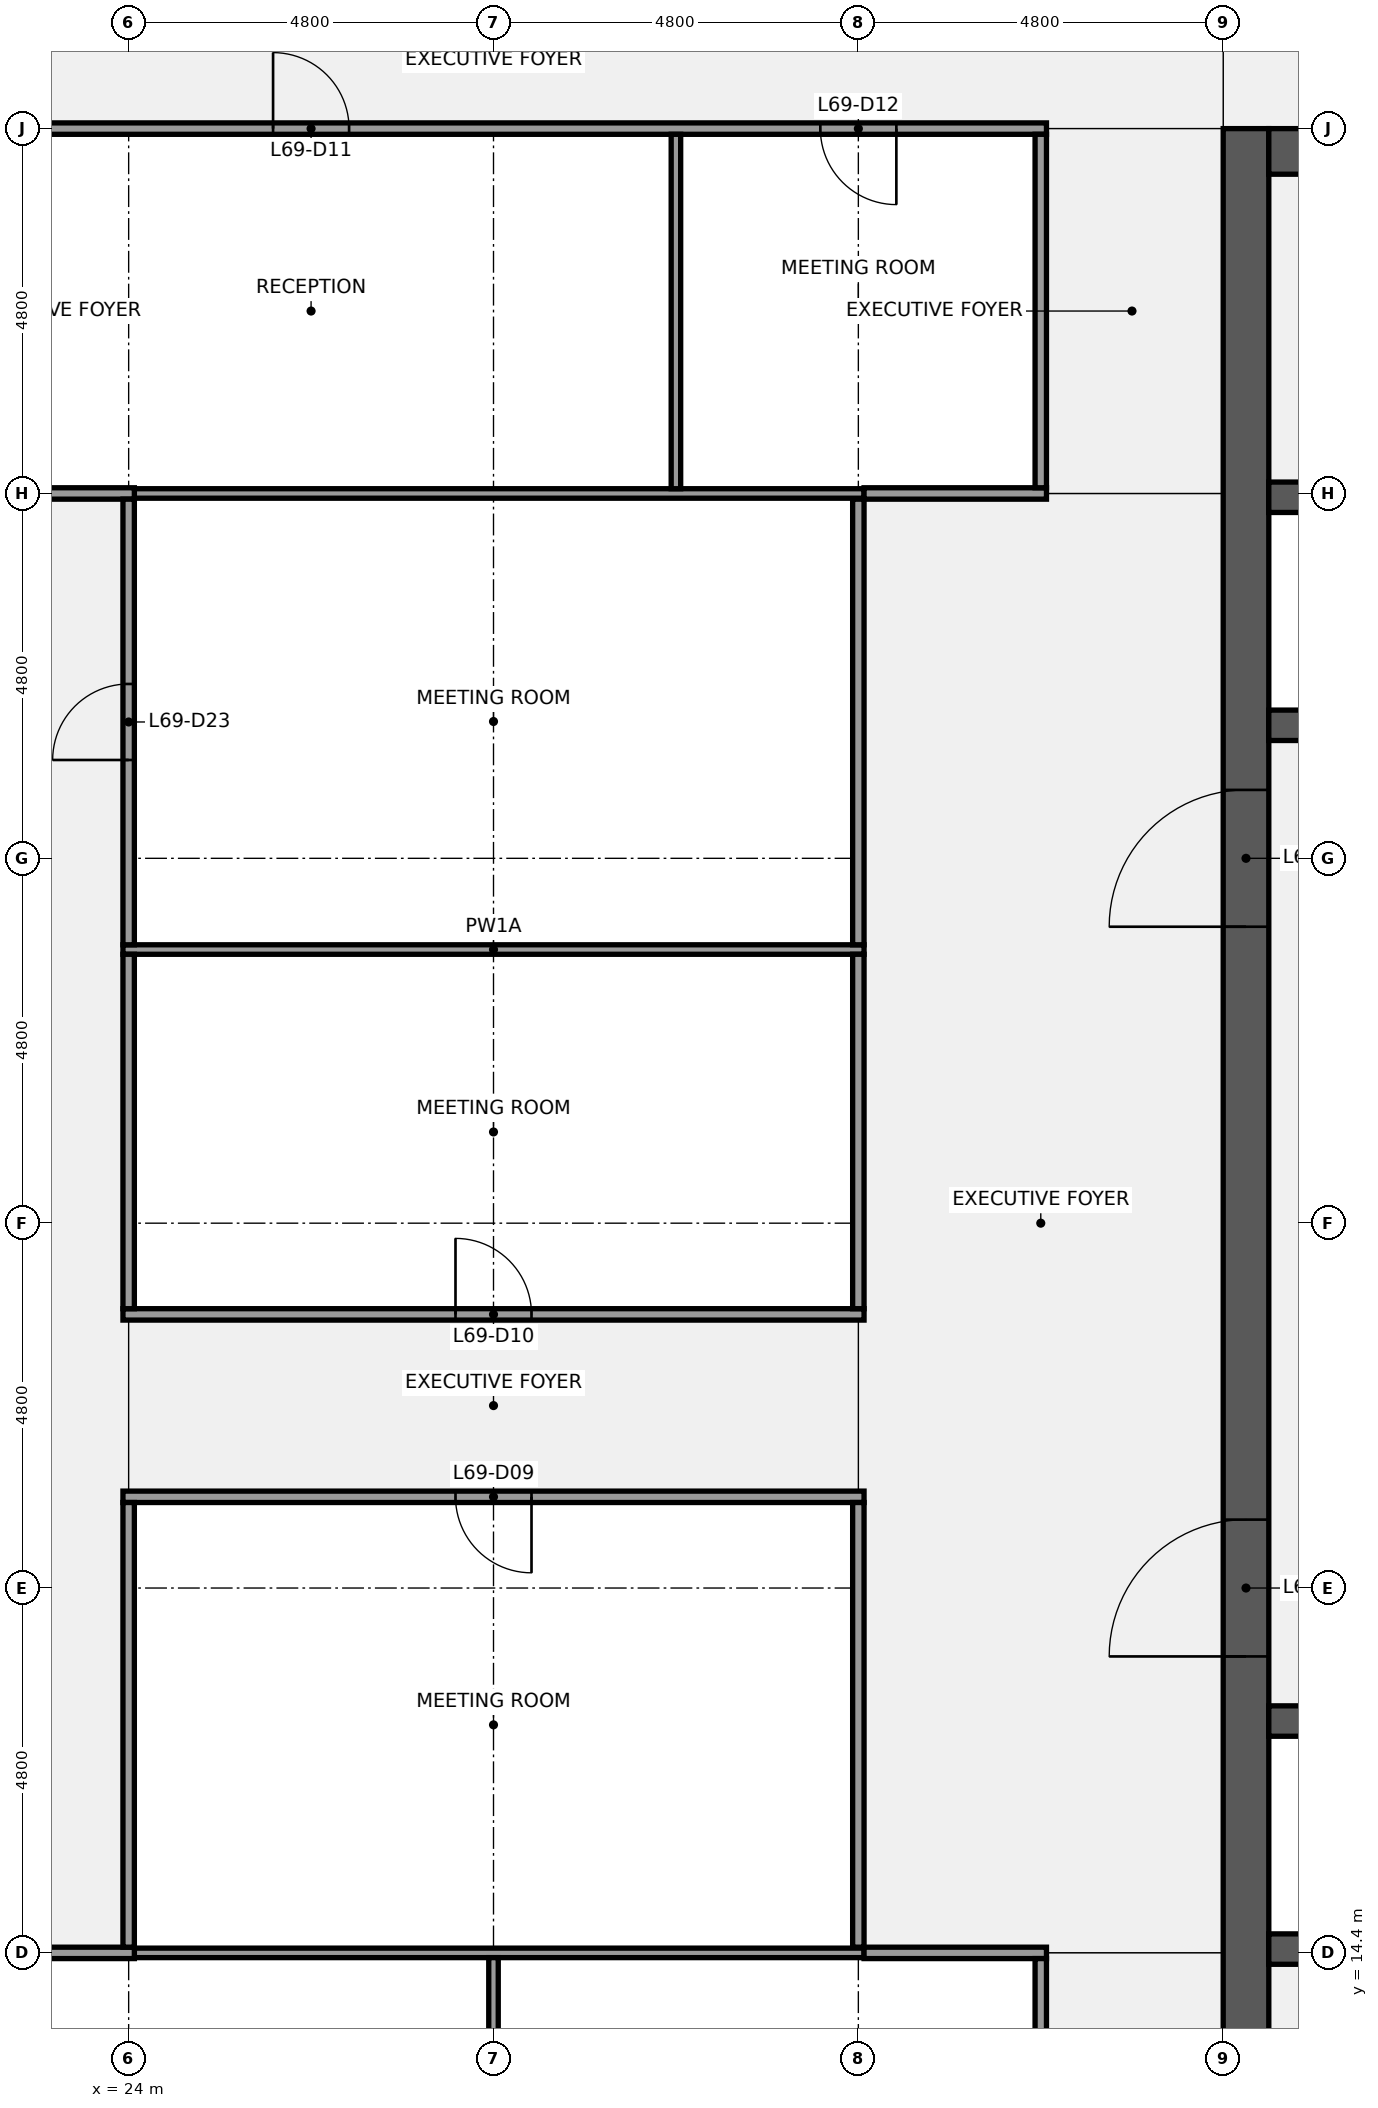
"""IFC4 building model, lengths in metres.
Left out: names, types, materials, properties, quantities, classifications, styles, units other than length and angle.
Written with IfcOpenShell. Run it as: python <this file> out.ifc"""

import sys

from ifc_helpers import new_model, si_unit, direction, frame, frame_2d, origin, place, context, subcontext, project, spatial, rectangle, extrude, element, fill, save


model = new_model("IFC4")
c1 = context("Model", 3, precision=1e-05, world=origin(), true_north=direction((0.0, 1.0)))
c2 = subcontext(c1, "Body", "Model", "MODEL_VIEW")
j1 = project(units=[si_unit("LENGTHUNIT", "METRE"), si_unit("PLANEANGLEUNIT", "RADIAN")], contexts=[c1])
p1 = place(None, origin())
s1 = spatial("IfcSite", under=j1, at=p1, CompositionType="ELEMENT")
p2 = place(p1, origin())
s2 = spatial("IfcBuilding", under=s1, at=p2, CompositionType="ELEMENT")
p3 = place(p2, frame((0.0, 0.0, 314.3)))
s3 = spatial("IfcBuildingStorey", under=s2, at=p3, CompositionType="ELEMENT", Elevation=314.3)
p4 = place(p3, frame((38.7, 9.6, 0.0), z_axis=(0.0, 0.0, 1.0), x_axis=(0.0, 1.0, 0.0)))
e1 = element("IfcWall", 1, at=p4, inside=s3, PredefinedType="SHEAR", context=c2, shape_type="SweptSolid", body=[
    extrude(rectangle(XDim=28.8, YDim=0.6, at=frame_2d((14.4, 0.0))), origin(), (0.0, 0.0, 1.0), 3.84),
])
p5 = place(p4, frame((8.7, 0.0, 0.0)))
e2 = element("IfcOpeningElement", 2, at=p5, cuts=e1, PredefinedType="OPENING", context=c2, shape_type="SweptSolid", body=[
    extrude(rectangle(XDim=1.8, YDim=2.1, at=frame_2d((0.9, 1.05))), frame((0.0, 0.31, 0.0), z_axis=(0.0, -1.0, 0.0), x_axis=(1.0, 0.0, 0.0)), (0.0, 0.0, 1.0), 0.62),
])
p6 = place(p4, frame((18.3, 0.0, 0.0)))
e3 = element("IfcOpeningElement", 3, at=p6, cuts=e1, PredefinedType="OPENING", context=c2, shape_type="SweptSolid", body=[
    extrude(rectangle(XDim=1.8, YDim=2.1, at=frame_2d((0.9, 1.05))), frame((0.0, 0.31, 0.0), z_axis=(0.0, -1.0, 0.0), x_axis=(1.0, 0.0, 0.0)), (0.0, 0.0, 1.0), 0.62),
])
p7 = place(p3, frame((39.0, 14.45, 0.0), z_axis=(0.0, 0.0, 1.0), x_axis=(1.0, 0.0, 0.0)))
e4 = element("IfcWall", 4, at=p7, inside=s3, PredefinedType="SHEAR", context=c2, shape_type="SweptSolid", body=[
    extrude(rectangle(XDim=18.0, YDim=0.4, at=frame_2d((9.0, 0.0))), origin(), (0.0, 0.0, 1.0), 3.84),
])
p8 = place(p3, frame((39.0, 17.45, 0.0), z_axis=(0.0, 0.0, 1.0), x_axis=(1.0, 0.0, 0.0)))
e5 = element("IfcWall", 5, at=p8, inside=s3, PredefinedType="SHEAR", context=c2, shape_type="SweptSolid", body=[
    extrude(rectangle(XDim=18.0, YDim=0.4, at=frame_2d((9.0, 0.0))), origin(), (0.0, 0.0, 1.0), 3.84),
])
p9 = place(p8, frame((14.837, 0.0, 0.0)))
e6 = element("IfcOpeningElement", 6, at=p9, cuts=e5, PredefinedType="OPENING", context=c2, shape_type="SweptSolid", body=[
    extrude(rectangle(XDim=1.0, YDim=2.1, at=frame_2d((0.5, 1.05))), frame((0.0, 0.21, 0.0), z_axis=(0.0, -1.0, 0.0), x_axis=(1.0, 0.0, 0.0)), (0.0, 0.0, 1.0), 0.42),
])
p10 = place(p8, frame((10.9, 0.0, 0.0)))
e7 = element("IfcOpeningElement", 7, at=p10, cuts=e5, PredefinedType="OPENING", context=c2, shape_type="SweptSolid", body=[
    extrude(rectangle(XDim=1.0, YDim=2.1, at=frame_2d((0.5, 1.05))), frame((0.0, 0.21, 0.0), z_axis=(0.0, -1.0, 0.0), x_axis=(1.0, 0.0, 0.0)), (0.0, 0.0, 1.0), 0.42),
])
p11 = place(p8, frame((8.5, 0.0, 0.0)))
e8 = element("IfcOpeningElement", 8, at=p11, cuts=e5, PredefinedType="OPENING", context=c2, shape_type="SweptSolid", body=[
    extrude(rectangle(XDim=1.0, YDim=2.1, at=frame_2d((0.5, 1.05))), frame((0.0, 0.21, 0.0), z_axis=(0.0, -1.0, 0.0), x_axis=(1.0, 0.0, 0.0)), (0.0, 0.0, 1.0), 0.42),
])
p12 = place(p8, frame((3.363, 0.0, 0.0)))
e9 = element("IfcOpeningElement", 9, at=p12, cuts=e5, PredefinedType="OPENING", context=c2, shape_type="SweptSolid", body=[
    extrude(rectangle(XDim=1.0, YDim=2.1, at=frame_2d((0.5, 1.05))), frame((0.0, 0.21, 0.0), z_axis=(0.0, -1.0, 0.0), x_axis=(1.0, 0.0, 0.0)), (0.0, 0.0, 1.0), 0.42),
])
p13 = place(p3, frame((39.0, 30.55, 0.0), z_axis=(0.0, 0.0, 1.0), x_axis=(1.0, 0.0, 0.0)))
e10 = element("IfcWall", 10, at=p13, inside=s3, PredefinedType="SHEAR", context=c2, shape_type="SweptSolid", body=[
    extrude(rectangle(XDim=18.0, YDim=0.4, at=frame_2d((9.0, 0.0))), origin(), (0.0, 0.0, 1.0), 3.84),
])
p14 = place(p13, frame((15.2, 0.0, 0.0)))
e11 = element("IfcOpeningElement", 11, at=p14, cuts=e10, PredefinedType="OPENING", context=c2, shape_type="SweptSolid", body=[
    extrude(rectangle(XDim=1.2, YDim=2.1, at=frame_2d((0.6, 1.05))), frame((0.0, 0.21, 0.0), z_axis=(0.0, -1.0, 0.0), x_axis=(1.0, 0.0, 0.0)), (0.0, 0.0, 1.0), 0.42),
])
p15 = place(p13, frame((12.6, 0.0, 0.0)))
e12 = element("IfcOpeningElement", 12, at=p15, cuts=e10, PredefinedType="OPENING", context=c2, shape_type="SweptSolid", body=[
    extrude(rectangle(XDim=1.2, YDim=2.1, at=frame_2d((0.6, 1.05))), frame((0.0, 0.21, 0.0), z_axis=(0.0, -1.0, 0.0), x_axis=(1.0, 0.0, 0.0)), (0.0, 0.0, 1.0), 0.42),
])
p16 = place(p13, frame((10.0, 0.0, 0.0)))
e13 = element("IfcOpeningElement", 13, at=p16, cuts=e10, PredefinedType="OPENING", context=c2, shape_type="SweptSolid", body=[
    extrude(rectangle(XDim=1.2, YDim=2.1, at=frame_2d((0.6, 1.05))), frame((0.0, 0.21, 0.0), z_axis=(0.0, -1.0, 0.0), x_axis=(1.0, 0.0, 0.0)), (0.0, 0.0, 1.0), 0.42),
])
p17 = place(p13, frame((6.8, 0.0, 0.0)))
e14 = element("IfcOpeningElement", 14, at=p17, cuts=e10, PredefinedType="OPENING", context=c2, shape_type="SweptSolid", body=[
    extrude(rectangle(XDim=1.2, YDim=2.1, at=frame_2d((0.6, 1.05))), frame((0.0, 0.21, 0.0), z_axis=(0.0, -1.0, 0.0), x_axis=(1.0, 0.0, 0.0)), (0.0, 0.0, 1.0), 0.42),
])
p18 = place(p13, frame((4.2, 0.0, 0.0)))
e15 = element("IfcOpeningElement", 15, at=p18, cuts=e10, PredefinedType="OPENING", context=c2, shape_type="SweptSolid", body=[
    extrude(rectangle(XDim=1.2, YDim=2.1, at=frame_2d((0.6, 1.05))), frame((0.0, 0.21, 0.0), z_axis=(0.0, -1.0, 0.0), x_axis=(1.0, 0.0, 0.0)), (0.0, 0.0, 1.0), 0.42),
])
p19 = place(p13, frame((1.6, 0.0, 0.0)))
e16 = element("IfcOpeningElement", 16, at=p19, cuts=e10, PredefinedType="OPENING", context=c2, shape_type="SweptSolid", body=[
    extrude(rectangle(XDim=1.2, YDim=2.1, at=frame_2d((0.6, 1.05))), frame((0.0, 0.21, 0.0), z_axis=(0.0, -1.0, 0.0), x_axis=(1.0, 0.0, 0.0)), (0.0, 0.0, 1.0), 0.42),
])
p20 = place(p3, frame((39.0, 33.55, 0.0), z_axis=(0.0, 0.0, 1.0), x_axis=(1.0, 0.0, 0.0)))
e17 = element("IfcWall", 17, at=p20, inside=s3, PredefinedType="SHEAR", context=c2, shape_type="SweptSolid", body=[
    extrude(rectangle(XDim=18.0, YDim=0.4, at=frame_2d((9.0, 0.0))), origin(), (0.0, 0.0, 1.0), 3.84),
])
p21 = place(p3, frame((39.0, 38.1, 0.0), z_axis=(0.0, 0.0, 1.0), x_axis=(1.0, 0.0, 0.0)))
e18 = element("IfcWall", 18, at=p21, inside=s3, PredefinedType="SHEAR", context=c2, shape_type="SweptSolid", body=[
    extrude(rectangle(XDim=4.2, YDim=0.6, at=frame_2d((2.1, 0.0))), origin(), (0.0, 0.0, 1.0), 3.84),
])
p22 = place(p21, frame((1.25, 0.0, 0.0)))
e19 = element("IfcOpeningElement", 19, at=p22, cuts=e18, PredefinedType="OPENING", context=c2, shape_type="SweptSolid", body=[
    extrude(rectangle(XDim=1.1, YDim=2.1, at=frame_2d((0.55, 1.05))), frame((0.0, 0.31, 0.0), z_axis=(0.0, -1.0, 0.0), x_axis=(1.0, 0.0, 0.0)), (0.0, 0.0, 1.0), 0.62),
])
p23 = place(p3, frame((24.075, 14.4, 0.0), z_axis=(0.0, 0.0, 1.0), x_axis=(1.0, 0.0, 0.0)))
e20 = element("IfcWall", 20, at=p23, inside=s3, PredefinedType="PARTITIONING", context=c2, shape_type="SweptSolid", body=[
    extrude(rectangle(XDim=9.6, YDim=0.125, at=frame_2d((4.8, 0.0))), origin(), (0.0, 0.0, 1.0), 2.87),
])
p24 = place(p3, frame((21.525, 14.4, 0.0), z_axis=(0.0, 0.0, 1.0), x_axis=(1.0, 0.0, 0.0)))
e21 = element("IfcWall", 21, at=p24, inside=s3, PredefinedType="PARTITIONING", context=c2, shape_type="SweptSolid", body=[
    extrude(rectangle(XDim=2.55, YDim=0.15, at=frame_2d((1.275, 0.0))), origin(), (0.0, 0.0, 1.0), 2.87),
])
p25 = place(p3, frame((33.675, 14.4, 0.0), z_axis=(0.0, 0.0, 1.0), x_axis=(1.0, 0.0, 0.0)))
e22 = element("IfcWall", 22, at=p25, inside=s3, PredefinedType="PARTITIONING", context=c2, shape_type="SweptSolid", body=[
    extrude(rectangle(XDim=2.4, YDim=0.15, at=frame_2d((1.2, 0.0))), origin(), (0.0, 0.0, 1.0), 2.87),
])
p26 = place(p3, frame((23.925, 20.4, 0.0), z_axis=(0.0, 0.0, 1.0), x_axis=(1.0, 0.0, 0.0)))
e23 = element("IfcWall", 23, at=p26, inside=s3, PredefinedType="PARTITIONING", context=c2, shape_type="SweptSolid", body=[
    extrude(rectangle(XDim=9.75, YDim=0.15, at=frame_2d((4.875, 0.0))), origin(), (0.0, 0.0, 1.0), 2.87),
])
p27 = place(p26, frame((4.375, 0.0, 0.0)))
e24 = element("IfcOpeningElement", 24, at=p27, cuts=e23, PredefinedType="OPENING", context=c2, shape_type="SweptSolid", body=[
    extrude(rectangle(XDim=1.0, YDim=2.1, at=frame_2d((0.5, 1.05))), frame((0.0, 0.085, 0.0), z_axis=(0.0, -1.0, 0.0), x_axis=(1.0, 0.0, 0.0)), (0.0, 0.0, 1.0), 0.17),
])
p28 = place(p3, frame((23.925, 22.8, 0.0), z_axis=(0.0, 0.0, 1.0), x_axis=(1.0, 0.0, 0.0)))
e25 = element("IfcWall", 25, at=p28, inside=s3, PredefinedType="PARTITIONING", context=c2, shape_type="SweptSolid", body=[
    extrude(rectangle(XDim=9.75, YDim=0.15, at=frame_2d((4.875, 0.0))), origin(), (0.0, 0.0, 1.0), 2.87),
])
p29 = place(p28, frame((4.375, 0.0, 0.0)))
e26 = element("IfcOpeningElement", 26, at=p29, cuts=e25, PredefinedType="OPENING", context=c2, shape_type="SweptSolid", body=[
    extrude(rectangle(XDim=1.0, YDim=2.1, at=frame_2d((0.5, 1.05))), frame((0.0, 0.085, 0.0), z_axis=(0.0, -1.0, 0.0), x_axis=(1.0, 0.0, 0.0)), (0.0, 0.0, 1.0), 0.17),
])
p30 = place(p3, frame((23.925, 27.6, 0.0), z_axis=(0.0, 0.0, 1.0), x_axis=(1.0, 0.0, 0.0)))
e27 = element("IfcWall", 27, at=p30, inside=s3, PredefinedType="PARTITIONING", context=c2, shape_type="SweptSolid", body=[
    extrude(rectangle(XDim=9.75, YDim=0.125, at=frame_2d((4.875, 0.0))), origin(), (0.0, 0.0, 1.0), 2.87),
])
p31 = place(p3, frame((24.075, 33.6, 0.0), z_axis=(0.0, 0.0, 1.0), x_axis=(1.0, 0.0, 0.0)))
e28 = element("IfcWall", 28, at=p31, inside=s3, PredefinedType="PARTITIONING", context=c2, shape_type="SweptSolid", body=[
    extrude(rectangle(XDim=9.6, YDim=0.125, at=frame_2d((4.8, 0.0))), origin(), (0.0, 0.0, 1.0), 2.87),
])
p32 = place(p3, frame((21.525, 33.6, 0.0), z_axis=(0.0, 0.0, 1.0), x_axis=(1.0, 0.0, 0.0)))
e29 = element("IfcWall", 29, at=p32, inside=s3, PredefinedType="PARTITIONING", context=c2, shape_type="SweptSolid", body=[
    extrude(rectangle(XDim=2.55, YDim=0.15, at=frame_2d((1.275, 0.0))), origin(), (0.0, 0.0, 1.0), 2.87),
])
p33 = place(p3, frame((33.675, 33.6, 0.0), z_axis=(0.0, 0.0, 1.0), x_axis=(1.0, 0.0, 0.0)))
e30 = element("IfcWall", 30, at=p33, inside=s3, PredefinedType="PARTITIONING", context=c2, shape_type="SweptSolid", body=[
    extrude(rectangle(XDim=2.4, YDim=0.15, at=frame_2d((1.2, 0.0))), origin(), (0.0, 0.0, 1.0), 2.87),
])
p34 = place(p3, frame((21.525, 38.4, 0.0), z_axis=(0.0, 0.0, 1.0), x_axis=(1.0, 0.0, 0.0)))
e31 = element("IfcWall", 31, at=p34, inside=s3, PredefinedType="PARTITIONING", context=c2, shape_type="SweptSolid", body=[
    extrude(rectangle(XDim=14.55, YDim=0.15, at=frame_2d((7.275, 0.0))), origin(), (0.0, 0.0, 1.0), 2.87),
])
p35 = place(p34, frame((4.375, 0.0, 0.0)))
e32 = element("IfcOpeningElement", 32, at=p35, cuts=e31, PredefinedType="OPENING", context=c2, shape_type="SweptSolid", body=[
    extrude(rectangle(XDim=1.0, YDim=2.1, at=frame_2d((0.5, 1.05))), frame((0.0, 0.085, 0.0), z_axis=(0.0, -1.0, 0.0), x_axis=(1.0, 0.0, 0.0)), (0.0, 0.0, 1.0), 0.17),
])
p36 = place(p34, frame((11.575, 0.0, 0.0)))
e33 = element("IfcOpeningElement", 33, at=p36, cuts=e31, PredefinedType="OPENING", context=c2, shape_type="SweptSolid", body=[
    extrude(rectangle(XDim=1.0, YDim=2.1, at=frame_2d((0.5, 1.05))), frame((0.0, 0.085, 0.0), z_axis=(0.0, -1.0, 0.0), x_axis=(1.0, 0.0, 0.0)), (0.0, 0.0, 1.0), 0.17),
])
p37 = place(p3, frame((24.0, 14.475, 0.0), z_axis=(0.0, 0.0, 1.0), x_axis=(0.0, 1.0, 0.0)))
e34 = element("IfcWall", 34, at=p37, inside=s3, PredefinedType="PARTITIONING", context=c2, shape_type="SweptSolid", body=[
    extrude(rectangle(XDim=5.85, YDim=0.15, at=frame_2d((2.925, 0.0))), origin(), (0.0, 0.0, 1.0), 2.87),
])
p38 = place(p3, frame((24.0, 22.875, 0.0), z_axis=(0.0, 0.0, 1.0), x_axis=(0.0, 1.0, 0.0)))
e35 = element("IfcWall", 35, at=p38, inside=s3, PredefinedType="PARTITIONING", context=c2, shape_type="SweptSolid", body=[
    extrude(rectangle(XDim=4.663, YDim=0.15, at=frame_2d((2.331, 0.0))), origin(), (0.0, 0.0, 1.0), 2.87),
])
p39 = place(p3, frame((24.0, 27.663, 0.0), z_axis=(0.0, 0.0, 1.0), x_axis=(0.0, 1.0, 0.0)))
e36 = element("IfcWall", 36, at=p39, inside=s3, PredefinedType="PARTITIONING", context=c2, shape_type="SweptSolid", body=[
    extrude(rectangle(XDim=5.862, YDim=0.15, at=frame_2d((2.931, 0.0))), origin(), (0.0, 0.0, 1.0), 2.87),
])
p40 = place(p39, frame((2.431, 0.0, 0.0)))
e37 = element("IfcOpeningElement", 37, at=p40, cuts=e36, PredefinedType="OPENING", context=c2, shape_type="SweptSolid", body=[
    extrude(rectangle(XDim=1.0, YDim=2.1, at=frame_2d((0.5, 1.05))), frame((0.0, 0.085, 0.0), z_axis=(0.0, -1.0, 0.0), x_axis=(1.0, 0.0, 0.0)), (0.0, 0.0, 1.0), 0.17),
])
for number, where, z_axis, x_axis in (
    (38, (28.8, 9.675, 0.0), (0.0, 0.0, 1.0), (0.0, 1.0, 0.0)),
    (39, (31.2, 33.663, 0.0), (0.0, 0.0, 1.0), (0.0, 1.0, 0.0)),
):
    element("IfcWall", number, at=place(p3, frame(where, z_axis=z_axis, x_axis=x_axis)), inside=s3, PredefinedType="PARTITIONING", context=c2, shape_type="SweptSolid", body=[
        extrude(rectangle(XDim=4.662, YDim=0.125, at=frame_2d((2.331, 0.0))), origin(), (0.0, 0.0, 1.0), 2.87),
    ])
p41 = place(p3, frame((33.6, 14.475, 0.0), z_axis=(0.0, 0.0, 1.0), x_axis=(0.0, 1.0, 0.0)))
e40 = element("IfcWall", 40, at=p41, inside=s3, PredefinedType="PARTITIONING", context=c2, shape_type="SweptSolid", body=[
    extrude(rectangle(XDim=5.85, YDim=0.15, at=frame_2d((2.925, 0.0))), origin(), (0.0, 0.0, 1.0), 2.87),
])
p42 = place(p3, frame((33.6, 22.875, 0.0), z_axis=(0.0, 0.0, 1.0), x_axis=(0.0, 1.0, 0.0)))
e41 = element("IfcWall", 41, at=p42, inside=s3, PredefinedType="PARTITIONING", context=c2, shape_type="SweptSolid", body=[
    extrude(rectangle(XDim=4.663, YDim=0.15, at=frame_2d((2.331, 0.0))), origin(), (0.0, 0.0, 1.0), 2.87),
])
p43 = place(p3, frame((33.6, 27.663, 0.0), z_axis=(0.0, 0.0, 1.0), x_axis=(0.0, 1.0, 0.0)))
e42 = element("IfcWall", 42, at=p43, inside=s3, PredefinedType="PARTITIONING", context=c2, shape_type="SweptSolid", body=[
    extrude(rectangle(XDim=5.862, YDim=0.15, at=frame_2d((2.931, 0.0))), origin(), (0.0, 0.0, 1.0), 2.87),
])
for number, where, z_axis, x_axis in (
    (43, (36.0, 9.675, 0.0), (0.0, 0.0, 1.0), (0.0, 1.0, 0.0)),
    (44, (36.0, 33.675, 0.0), (0.0, 0.0, 1.0), (0.0, 1.0, 0.0)),
):
    element("IfcWall", number, at=place(p3, frame(where, z_axis=z_axis, x_axis=x_axis)), inside=s3, PredefinedType="PARTITIONING", context=c2, shape_type="SweptSolid", body=[
        extrude(rectangle(XDim=4.65, YDim=0.15, at=frame_2d((2.325, 0.0))), origin(), (0.0, 0.0, 1.0), 2.87),
    ])
p44 = place(p5, origin())
e45 = element("IfcDoor", 45, at=p44, inside=s3, OperationType="DOUBLE_DOOR_SINGLE_SWING", PredefinedType="DOOR", context=c2, shape_type="SweptSolid", body=[
    extrude(rectangle(XDim=1.8, YDim=2.1, at=frame_2d((0.9, 1.05))), frame((0.0, 0.025, 0.0), z_axis=(0.0, -1.0, 0.0), x_axis=(1.0, 0.0, 0.0)), (0.0, 0.0, 1.0), 0.05),
])
fill(e2, e45)
p45 = place(p6, origin())
e46 = element("IfcDoor", 46, at=p45, inside=s3, OperationType="DOUBLE_DOOR_SINGLE_SWING", PredefinedType="DOOR", context=c2, shape_type="SweptSolid", body=[
    extrude(rectangle(XDim=1.8, YDim=2.1, at=frame_2d((0.9, 1.05))), frame((0.0, 0.025, 0.0), z_axis=(0.0, -1.0, 0.0), x_axis=(1.0, 0.0, 0.0)), (0.0, 0.0, 1.0), 0.05),
])
fill(e3, e46)
p46 = place(p27, origin())
e47 = element("IfcDoor", 47, at=p46, inside=s3, OperationType="SINGLE_SWING_RIGHT", PredefinedType="DOOR", context=c2, shape_type="SweptSolid", body=[
    extrude(rectangle(XDim=1.0, YDim=2.1, at=frame_2d((0.5, 1.05))), frame((0.0, 0.025, 0.0), z_axis=(0.0, -1.0, 0.0), x_axis=(1.0, 0.0, 0.0)), (0.0, 0.0, 1.0), 0.05),
])
fill(e24, e47)
p47 = place(p29, origin())
e48 = element("IfcDoor", 48, at=p47, inside=s3, OperationType="SINGLE_SWING_LEFT", PredefinedType="DOOR", context=c2, shape_type="SweptSolid", body=[
    extrude(rectangle(XDim=1.0, YDim=2.1, at=frame_2d((0.5, 1.05))), frame((0.0, 0.025, 0.0), z_axis=(0.0, -1.0, 0.0), x_axis=(1.0, 0.0, 0.0)), (0.0, 0.0, 1.0), 0.05),
])
fill(e26, e48)
p48 = place(p35, origin())
e49 = element("IfcDoor", 49, at=p48, inside=s3, OperationType="SINGLE_SWING_LEFT", PredefinedType="DOOR", context=c2, shape_type="SweptSolid", body=[
    extrude(rectangle(XDim=1.0, YDim=2.1, at=frame_2d((0.5, 1.05))), frame((0.0, 0.025, 0.0), z_axis=(0.0, -1.0, 0.0), x_axis=(1.0, 0.0, 0.0)), (0.0, 0.0, 1.0), 0.05),
])
fill(e32, e49)
p49 = place(p36, origin())
e50 = element("IfcDoor", 50, at=p49, inside=s3, OperationType="SINGLE_SWING_RIGHT", PredefinedType="DOOR", context=c2, shape_type="SweptSolid", body=[
    extrude(rectangle(XDim=1.0, YDim=2.1, at=frame_2d((0.5, 1.05))), frame((0.0, 0.025, 0.0), z_axis=(0.0, -1.0, 0.0), x_axis=(1.0, 0.0, 0.0)), (0.0, 0.0, 1.0), 0.05),
])
fill(e33, e50)
p50 = place(p40, origin())
e51 = element("IfcDoor", 51, at=p50, inside=s3, OperationType="SINGLE_SWING_LEFT", PredefinedType="DOOR", context=c2, shape_type="SweptSolid", body=[
    extrude(rectangle(XDim=1.0, YDim=2.1, at=frame_2d((0.5, 1.05))), frame((0.0, 0.025, 0.0), z_axis=(0.0, -1.0, 0.0), x_axis=(1.0, 0.0, 0.0)), (0.0, 0.0, 1.0), 0.05),
])
fill(e37, e51)
save(model, sys.argv[1])
